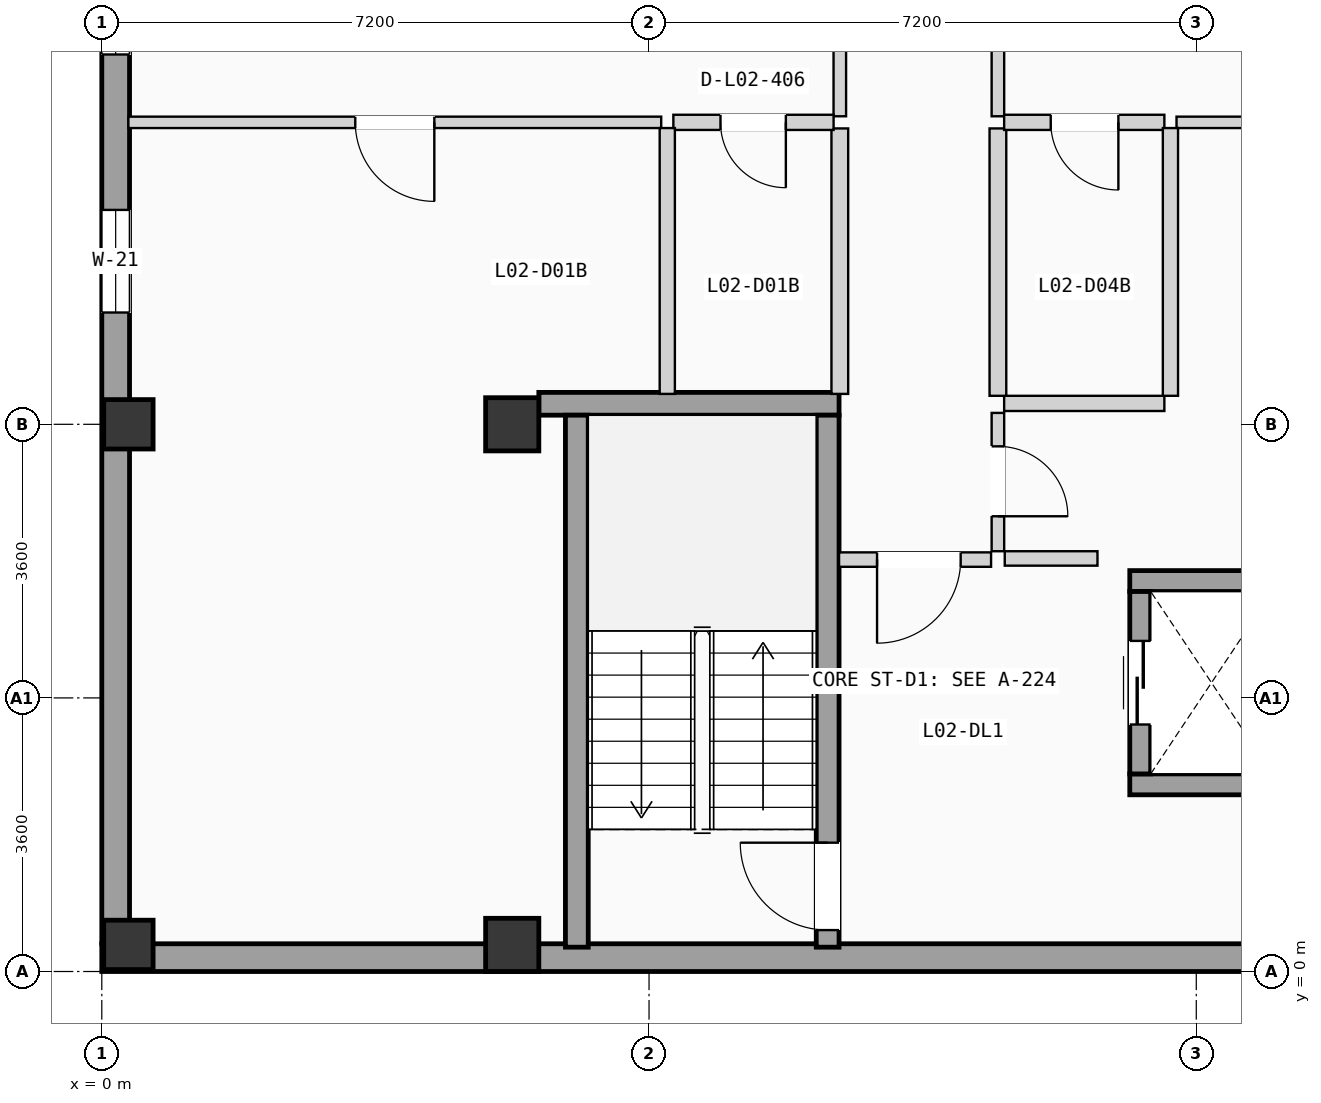
"""IFC4 building model, lengths in metres.
Left out: names, types, materials, properties, quantities, classifications, styles, units other than length and angle.
Written with IfcOpenShell. Run it as: python <this file> out.ifc"""

import sys

from ifc_helpers import new_model, si_unit, direction, frame, frame_2d, origin, origin_2d, place, context, subcontext, project, spatial, rectangle, extrude, element, fill, save


model = new_model("IFC4")
c1 = context("Model", 3, precision=1e-05, world=origin(), true_north=direction((0.0, 1.0)))
c2 = subcontext(c1, "Body", "Model", "MODEL_VIEW")
j1 = project(units=[si_unit("LENGTHUNIT", "METRE"), si_unit("PLANEANGLEUNIT", "RADIAN")], contexts=[c1])
p1 = place(None, origin())
s1 = spatial("IfcSite", under=j1, at=p1, CompositionType="ELEMENT")
p2 = place(p1, origin())
s2 = spatial("IfcBuilding", under=s1, at=p2, CompositionType="ELEMENT")
p3 = place(p2, frame((0.0, 0.0, 8.575)))
s3 = spatial("IfcBuildingStorey", under=s2, at=p3, CompositionType="ELEMENT", Elevation=8.575)
for number, where, z_axis, x_axis in (
    (1, (0.35, 0.35, 0.0), (0.0, 0.0, 1.0), (1.0, 0.0, 0.0)),
    (2, (0.35, 7.2, 0.0), (0.0, 0.0, 1.0), (1.0, 0.0, 0.0)),
):
    element("IfcColumn", number, at=place(p3, frame(where, z_axis=z_axis, x_axis=x_axis)), inside=s3, PredefinedType="COLUMN", context=c2, shape_type="SweptSolid", body=[
        extrude(rectangle(XDim=0.65, YDim=0.65, at=origin_2d()), origin(), (0.0, 0.0, 1.0), 3.5),
    ])
for number, where, z_axis, x_axis in (
    (3, (5.4, 0.35, 0.0), (0.0, 0.0, 1.0), (1.0, 0.0, 0.0)),
    (4, (5.4, 7.2, 0.0), (0.0, 0.0, 1.0), (1.0, 0.0, 0.0)),
):
    element("IfcColumn", number, at=place(p3, frame(where, z_axis=z_axis, x_axis=x_axis)), inside=s3, PredefinedType="COLUMN", context=c2, shape_type="SweptSolid", body=[
        extrude(rectangle(XDim=0.7, YDim=0.7, at=origin_2d()), origin(), (0.0, 0.0, 1.0), 3.5),
    ])
p4 = place(p3, frame((0.0, 0.183, 0.0), z_axis=(0.0, 0.0, 1.0), x_axis=(1.0, 0.0, 0.0)))
e5 = element("IfcWall", 5, at=p4, inside=s3, PredefinedType="SOLIDWALL", context=c2, shape_type="SweptSolid", body=[
    extrude(rectangle(XDim=21.6, YDim=0.365, at=frame_2d((10.8, 0.0))), origin(), (0.0, 0.0, 1.0), 3.24),
])
p5 = place(p3, frame((0.183, 0.365, 0.0), z_axis=(0.0, 0.0, 1.0), x_axis=(0.0, 1.0, 0.0)))
e6 = element("IfcWall", 6, at=p5, inside=s3, PredefinedType="SOLIDWALL", context=c2, shape_type="SweptSolid", body=[
    extrude(rectangle(XDim=49.67, YDim=0.365, at=frame_2d((24.835, 0.0))), origin(), (0.0, 0.0, 1.0), 3.24),
])
p6 = place(p5, frame((11.701, 0.0, 0.755)))
e7 = element("IfcOpeningElement", 7, at=p6, cuts=e6, PredefinedType="OPENING", context=c2, shape_type="SweptSolid", body=[
    extrude(rectangle(XDim=1.25, YDim=1.8, at=frame_2d((0.625, 0.9))), frame((0.0, 0.192, 0.0), z_axis=(0.0, -1.0, 0.0), x_axis=(1.0, 0.0, 0.0)), (0.0, 0.0, 1.0), 0.385),
])
p7 = place(p5, frame((8.306, 0.0, 0.9)))
e8 = element("IfcOpeningElement", 8, at=p7, cuts=e6, PredefinedType="OPENING", context=c2, shape_type="SweptSolid", body=[
    extrude(rectangle(XDim=1.35, YDim=1.2, at=frame_2d((0.675, 0.6))), frame((0.0, 0.192, 0.0), z_axis=(0.0, -1.0, 0.0), x_axis=(1.0, 0.0, 0.0)), (0.0, 0.0, 1.0), 0.385),
])
p8 = place(p5, frame((16.34, 0.0, 0.9)))
e9 = element("IfcOpeningElement", 9, at=p8, cuts=e6, PredefinedType="OPENING", context=c2, shape_type="SweptSolid", body=[
    extrude(rectangle(XDim=1.35, YDim=1.35, at=frame_2d((0.675, 0.675))), frame((0.0, 0.192, 0.0), z_axis=(0.0, -1.0, 0.0), x_axis=(1.0, 0.0, 0.0)), (0.0, 0.0, 1.0), 0.385),
])
p9 = place(p5, frame((24.16, 0.0, 0.9)))
e10 = element("IfcOpeningElement", 10, at=p9, cuts=e6, PredefinedType="OPENING", context=c2, shape_type="SweptSolid", body=[
    extrude(rectangle(XDim=1.35, YDim=1.5, at=frame_2d((0.675, 0.75))), frame((0.0, 0.192, 0.0), z_axis=(0.0, -1.0, 0.0), x_axis=(1.0, 0.0, 0.0)), (0.0, 0.0, 1.0), 0.385),
])
p10 = place(p5, frame((19.278, 0.0, 0.9)))
e11 = element("IfcOpeningElement", 11, at=p10, cuts=e6, PredefinedType="OPENING", context=c2, shape_type="SweptSolid", body=[
    extrude(rectangle(XDim=1.35, YDim=1.65, at=frame_2d((0.675, 0.825))), frame((0.0, 0.192, 0.0), z_axis=(0.0, -1.0, 0.0), x_axis=(1.0, 0.0, 0.0)), (0.0, 0.0, 1.0), 0.385),
])
p11 = place(p5, frame((29.042, 0.0, 0.755)))
e12 = element("IfcOpeningElement", 12, at=p11, cuts=e6, PredefinedType="OPENING", context=c2, shape_type="SweptSolid", body=[
    extrude(rectangle(XDim=1.35, YDim=1.8, at=frame_2d((0.675, 0.9))), frame((0.0, 0.192, 0.0), z_axis=(0.0, -1.0, 0.0), x_axis=(1.0, 0.0, 0.0)), (0.0, 0.0, 1.0), 0.385),
])
p12 = place(p5, frame((36.603, 0.0, 0.9)))
e13 = element("IfcOpeningElement", 13, at=p12, cuts=e6, PredefinedType="OPENING", context=c2, shape_type="SweptSolid", body=[
    extrude(rectangle(XDim=1.48, YDim=1.2, at=frame_2d((0.74, 0.6))), frame((0.0, 0.192, 0.0), z_axis=(0.0, -1.0, 0.0), x_axis=(1.0, 0.0, 0.0)), (0.0, 0.0, 1.0), 0.385),
])
p13 = place(p5, frame((31.915, 0.0, 0.9)))
e14 = element("IfcOpeningElement", 14, at=p13, cuts=e6, PredefinedType="OPENING", context=c2, shape_type="SweptSolid", body=[
    extrude(rectangle(XDim=1.48, YDim=1.35, at=frame_2d((0.74, 0.675))), frame((0.0, 0.192, 0.0), z_axis=(0.0, -1.0, 0.0), x_axis=(1.0, 0.0, 0.0)), (0.0, 0.0, 1.0), 0.385),
])
p14 = place(p5, frame((39.948, 0.0, 0.9)))
e15 = element("IfcOpeningElement", 15, at=p14, cuts=e6, PredefinedType="OPENING", context=c2, shape_type="SweptSolid", body=[
    extrude(rectangle(XDim=1.48, YDim=1.5, at=frame_2d((0.74, 0.75))), frame((0.0, 0.192, 0.0), z_axis=(0.0, -1.0, 0.0), x_axis=(1.0, 0.0, 0.0)), (0.0, 0.0, 1.0), 0.385),
])
p15 = place(p3, frame((5.75, 7.47, 0.0), z_axis=(0.0, 0.0, 1.0), x_axis=(1.0, 0.0, 0.0)))
e16 = element("IfcWall", 16, at=p15, inside=s3, PredefinedType="SHEAR", context=c2, shape_type="SweptSolid", body=[
    extrude(rectangle(XDim=3.95, YDim=0.3, at=frame_2d((1.975, 0.0))), origin(), (0.0, 0.0, 1.0), 3.24),
])
p16 = place(p3, frame((6.25, 0.32, 0.0), z_axis=(0.0, 0.0, 1.0), x_axis=(0.0, 1.0, 0.0)))
e17 = element("IfcWall", 17, at=p16, inside=s3, PredefinedType="SHEAR", context=c2, shape_type="SweptSolid", body=[
    extrude(rectangle(XDim=7.0, YDim=0.3, at=frame_2d((3.5, 0.0))), origin(), (0.0, 0.0, 1.0), 3.24),
])
p17 = place(p3, frame((9.55, 0.32, 0.0), z_axis=(0.0, 0.0, 1.0), x_axis=(0.0, 1.0, 0.0)))
e18 = element("IfcWall", 18, at=p17, inside=s3, PredefinedType="SHEAR", context=c2, shape_type="SweptSolid", body=[
    extrude(rectangle(XDim=7.0, YDim=0.3, at=frame_2d((3.5, 0.0))), origin(), (0.0, 0.0, 1.0), 3.24),
])
p18 = place(p17, frame((0.225, 0.0, 0.0)))
e19 = element("IfcOpeningElement", 19, at=p18, cuts=e18, PredefinedType="OPENING", context=c2, shape_type="SweptSolid", body=[
    extrude(rectangle(XDim=1.15, YDim=2.12, at=frame_2d((0.575, 1.06))), frame((0.0, 0.16, 0.0), z_axis=(0.0, -1.0, 0.0), x_axis=(1.0, 0.0, 0.0)), (0.0, 0.0, 1.0), 0.32),
])
for number, where, z_axis, x_axis in (
    (20, (13.525, 2.462, 0.0), (0.0, 0.0, 1.0), (1.0, 0.0, 0.0)),
    (21, (13.525, 5.137, 0.0), (0.0, 0.0, 1.0), (1.0, 0.0, 0.0)),
):
    element("IfcWall", number, at=place(p3, frame(where, z_axis=z_axis, x_axis=x_axis)), inside=s3, PredefinedType="SHEAR", context=c2, shape_type="SweptSolid", body=[
        extrude(rectangle(XDim=2.15, YDim=0.275, at=frame_2d((1.075, 0.0))), origin(), (0.0, 0.0, 1.0), 3.24),
    ])
p19 = place(p3, frame((13.663, 2.6, 0.0), z_axis=(0.0, 0.0, 1.0), x_axis=(0.0, 1.0, 0.0)))
e22 = element("IfcWall", 22, at=p19, inside=s3, PredefinedType="SHEAR", context=c2, shape_type="SweptSolid", body=[
    extrude(rectangle(XDim=2.4, YDim=0.275, at=frame_2d((1.2, 0.0))), origin(), (0.0, 0.0, 1.0), 3.24),
])
p20 = place(p19, frame((0.65, 0.0, 0.0)))
e23 = element("IfcOpeningElement", 23, at=p20, cuts=e22, PredefinedType="OPENING", context=c2, shape_type="SweptSolid", body=[
    extrude(rectangle(XDim=1.1, YDim=2.15, at=frame_2d((0.55, 1.075))), frame((0.0, 0.147, 0.0), z_axis=(0.0, -1.0, 0.0), x_axis=(1.0, 0.0, 0.0)), (0.0, 0.0, 1.0), 0.295),
])
p21 = place(p3, frame((11.88, 5.435, 0.0), z_axis=(0.0, 0.0, 1.0), x_axis=(1.0, 0.0, 0.0)))
e24 = element("IfcWall", 24, at=p21, inside=s3, PredefinedType="PARTITIONING", context=c2, shape_type="SweptSolid", body=[
    extrude(rectangle(XDim=1.22, YDim=0.19, at=frame_2d((0.61, 0.0))), origin(), (0.0, 0.0, 1.0), 3.22),
])
p22 = place(p3, frame((9.7, 5.42, 0.0), z_axis=(0.0, 0.0, 1.0), x_axis=(1.0, 0.0, 0.0)))
e25 = element("IfcWall", 25, at=p22, inside=s3, PredefinedType="PARTITIONING", context=c2, shape_type="SweptSolid", body=[
    extrude(rectangle(XDim=2.0, YDim=0.19, at=frame_2d((1.0, 0.0))), origin(), (0.0, 0.0, 1.0), 3.22),
])
p23 = place(p22, frame((0.5, 0.0, 0.0)))
e26 = element("IfcOpeningElement", 26, at=p23, cuts=e25, PredefinedType="OPENING", context=c2, shape_type="SweptSolid", body=[
    extrude(rectangle(XDim=1.1, YDim=2.12, at=frame_2d((0.55, 1.06))), frame((0.0, 0.105, 0.0), z_axis=(0.0, -1.0, 0.0), x_axis=(1.0, 0.0, 0.0)), (0.0, 0.0, 1.0), 0.21),
])
p24 = place(p3, frame((11.79, 5.53, 0.0), z_axis=(0.0, 0.0, 1.0), x_axis=(0.0, 1.0, 0.0)))
e27 = element("IfcWall", 27, at=p24, inside=s3, PredefinedType="PARTITIONING", context=c2, shape_type="SweptSolid", body=[
    extrude(rectangle(XDim=1.82, YDim=0.165, at=frame_2d((0.91, 0.0))), origin(), (0.0, 0.0, 1.0), 3.22),
])
p25 = place(p24, frame((0.46, 0.0, 0.0)))
e28 = element("IfcOpeningElement", 28, at=p25, cuts=e27, PredefinedType="OPENING", context=c2, shape_type="SweptSolid", body=[
    extrude(rectangle(XDim=0.92, YDim=2.04, at=frame_2d((0.46, 1.02))), frame((0.0, 0.093, 0.0), z_axis=(0.0, -1.0, 0.0), x_axis=(1.0, 0.0, 0.0)), (0.0, 0.0, 1.0), 0.185),
])
p26 = place(p3, frame((11.872, 7.475, 0.0), z_axis=(0.0, 0.0, 1.0), x_axis=(1.0, 0.0, 0.0)))
e29 = element("IfcWall", 29, at=p26, inside=s3, PredefinedType="PLUMBINGWALL", context=c2, shape_type="SweptSolid", body=[
    extrude(rectangle(XDim=2.108, YDim=0.2, at=frame_2d((1.054, 0.0))), origin(), (0.0, 0.0, 1.0), 3.22),
])
p27 = place(p3, frame((9.71, 11.253, 0.0), z_axis=(0.0, 0.0, 1.0), x_axis=(0.0, 1.0, 0.0)))
e30 = element("IfcWall", 30, at=p27, inside=s3, PredefinedType="PARTITIONING", context=c2, shape_type="SweptSolid", body=[
    extrude(rectangle(XDim=4.22, YDim=0.165, at=frame_2d((2.11, 0.0))), origin(), (0.0, 0.0, 1.0), 3.22),
])
p28 = place(p27, frame((1.585, 0.0, 0.0)))
e31 = element("IfcOpeningElement", 31, at=p28, cuts=e30, PredefinedType="OPENING", context=c2, shape_type="SweptSolid", body=[
    extrude(rectangle(XDim=1.05, YDim=2.13, at=frame_2d((0.525, 1.065))), frame((0.0, 0.093, 0.0), z_axis=(0.0, -1.0, 0.0), x_axis=(1.0, 0.0, 0.0)), (0.0, 0.0, 1.0), 0.185),
])
p29 = place(p3, frame((9.71, 7.6, 0.0), z_axis=(0.0, 0.0, 1.0), x_axis=(0.0, 1.0, 0.0)))
e32 = element("IfcWall", 32, at=p29, inside=s3, PredefinedType="PLUMBINGWALL", context=c2, shape_type="SweptSolid", body=[
    extrude(rectangle(XDim=3.493, YDim=0.22, at=frame_2d((1.747, 0.0))), origin(), (0.0, 0.0, 1.0), 3.22),
])
p30 = place(p3, frame((11.79, 11.253, 0.0), z_axis=(0.0, 0.0, 1.0), x_axis=(0.0, 1.0, 0.0)))
e33 = element("IfcWall", 33, at=p30, inside=s3, PredefinedType="PARTITIONING", context=c2, shape_type="SweptSolid", body=[
    extrude(rectangle(XDim=4.22, YDim=0.165, at=frame_2d((2.11, 0.0))), origin(), (0.0, 0.0, 1.0), 3.22),
])
p31 = place(p30, frame((1.585, 0.0, 0.0)))
e34 = element("IfcOpeningElement", 34, at=p31, cuts=e33, PredefinedType="OPENING", context=c2, shape_type="SweptSolid", body=[
    extrude(rectangle(XDim=1.05, YDim=2.13, at=frame_2d((0.525, 1.065))), frame((0.0, 0.093, 0.0), z_axis=(0.0, -1.0, 0.0), x_axis=(1.0, 0.0, 0.0)), (0.0, 0.0, 1.0), 0.185),
])
p32 = place(p3, frame((11.79, 7.575, 0.0), z_axis=(0.0, 0.0, 1.0), x_axis=(0.0, 1.0, 0.0)))
e35 = element("IfcWall", 35, at=p32, inside=s3, PredefinedType="PLUMBINGWALL", context=c2, shape_type="SweptSolid", body=[
    extrude(rectangle(XDim=3.518, YDim=0.22, at=frame_2d((1.759, 0.0))), origin(), (0.0, 0.0, 1.0), 3.22),
])
p33 = place(p3, frame((7.52, 11.173, 0.0), z_axis=(0.0, 0.0, 1.0), x_axis=(1.0, 0.0, 0.0)))
e36 = element("IfcWall", 36, at=p33, inside=s3, PredefinedType="PLUMBINGWALL", context=c2, shape_type="SweptSolid", body=[
    extrude(rectangle(XDim=2.108, YDim=0.2, at=frame_2d((1.054, 0.0))), origin(), (0.0, 0.0, 1.0), 3.22),
])
p34 = place(p33, frame((0.62, 0.0, 0.0)))
e37 = element("IfcOpeningElement", 37, at=p34, cuts=e36, PredefinedType="OPENING", context=c2, shape_type="SweptSolid", body=[
    extrude(rectangle(XDim=0.86, YDim=2.0, at=frame_2d((0.43, 1.0))), frame((0.0, 0.11, 0.0), z_axis=(0.0, -1.0, 0.0), x_axis=(1.0, 0.0, 0.0)), (0.0, 0.0, 1.0), 0.22),
])
p35 = place(p3, frame((0.35, 11.173, 0.0), z_axis=(0.0, 0.0, 1.0), x_axis=(1.0, 0.0, 0.0)))
e38 = element("IfcWall", 38, at=p35, inside=s3, PredefinedType="PARTITIONING", context=c2, shape_type="SweptSolid", body=[
    extrude(rectangle(XDim=7.01, YDim=0.15, at=frame_2d((3.505, 0.0))), origin(), (0.0, 0.0, 1.0), 3.22),
])
p36 = place(p35, frame((2.985, 0.0, 0.0)))
e39 = element("IfcOpeningElement", 39, at=p36, cuts=e38, PredefinedType="OPENING", context=c2, shape_type="SweptSolid", body=[
    extrude(rectangle(XDim=1.04, YDim=2.08, at=frame_2d((0.52, 1.04))), frame((0.0, 0.085, 0.0), z_axis=(0.0, -1.0, 0.0), x_axis=(1.0, 0.0, 0.0)), (0.0, 0.0, 1.0), 0.17),
])
p37 = place(p3, frame((7.44, 7.6, 0.0), z_axis=(0.0, 0.0, 1.0), x_axis=(0.0, 1.0, 0.0)))
e40 = element("IfcWall", 40, at=p37, inside=s3, PredefinedType="PLUMBINGWALL", context=c2, shape_type="SweptSolid", body=[
    extrude(rectangle(XDim=3.498, YDim=0.2, at=frame_2d((1.749, 0.0))), origin(), (0.0, 0.0, 1.0), 3.22),
])
p38 = place(p3, frame((11.872, 11.173, 0.0), z_axis=(0.0, 0.0, 1.0), x_axis=(1.0, 0.0, 0.0)))
e41 = element("IfcWall", 41, at=p38, inside=s3, PredefinedType="PLUMBINGWALL", context=c2, shape_type="SweptSolid", body=[
    extrude(rectangle(XDim=2.108, YDim=0.2, at=frame_2d((1.054, 0.0))), origin(), (0.0, 0.0, 1.0), 3.22),
])
p39 = place(p38, frame((0.613, 0.0, 0.0)))
e42 = element("IfcOpeningElement", 42, at=p39, cuts=e41, PredefinedType="OPENING", context=c2, shape_type="SweptSolid", body=[
    extrude(rectangle(XDim=0.89, YDim=2.03, at=frame_2d((0.445, 1.015))), frame((0.0, 0.11, 0.0), z_axis=(0.0, -1.0, 0.0), x_axis=(1.0, 0.0, 0.0)), (0.0, 0.0, 1.0), 0.22),
])
p40 = place(p3, frame((14.14, 11.173, 0.0), z_axis=(0.0, 0.0, 1.0), x_axis=(1.0, 0.0, 0.0)))
e43 = element("IfcWall", 43, at=p40, inside=s3, PredefinedType="PARTITIONING", context=c2, shape_type="SweptSolid", body=[
    extrude(rectangle(XDim=7.11, YDim=0.15, at=frame_2d((3.555, 0.0))), origin(), (0.0, 0.0, 1.0), 3.22),
])
p41 = place(p40, frame((3.035, 0.0, 0.0)))
e44 = element("IfcOpeningElement", 44, at=p41, cuts=e43, PredefinedType="OPENING", context=c2, shape_type="SweptSolid", body=[
    extrude(rectangle(XDim=1.04, YDim=2.08, at=frame_2d((0.52, 1.04))), frame((0.0, 0.085, 0.0), z_axis=(0.0, -1.0, 0.0), x_axis=(1.0, 0.0, 0.0)), (0.0, 0.0, 1.0), 0.17),
])
p42 = place(p3, frame((14.06, 7.575, 0.0), z_axis=(0.0, 0.0, 1.0), x_axis=(0.0, 1.0, 0.0)))
e45 = element("IfcWall", 45, at=p42, inside=s3, PredefinedType="PLUMBINGWALL", context=c2, shape_type="SweptSolid", body=[
    extrude(rectangle(XDim=3.523, YDim=0.2, at=frame_2d((1.761, 0.0))), origin(), (0.0, 0.0, 1.0), 3.22),
])
p43 = place(p6, origin())
e46 = element("IfcWindow", 46, at=p43, inside=s3, PartitioningType="SINGLE_PANEL", PredefinedType="WINDOW", context=c2, shape_type="SweptSolid", body=[
    extrude(rectangle(XDim=1.25, YDim=1.8, at=frame_2d((0.625, 0.9))), frame((0.0, 0.03, 0.0), z_axis=(0.0, -1.0, 0.0), x_axis=(1.0, 0.0, 0.0)), (0.0, 0.0, 1.0), 0.06),
])
fill(e7, e46)
p44 = place(p7, origin())
e47 = element("IfcWindow", 47, at=p44, inside=s3, PartitioningType="SINGLE_PANEL", PredefinedType="WINDOW", context=c2, shape_type="SweptSolid", body=[
    extrude(rectangle(XDim=1.35, YDim=1.2, at=frame_2d((0.675, 0.6))), frame((0.0, 0.03, 0.0), z_axis=(0.0, -1.0, 0.0), x_axis=(1.0, 0.0, 0.0)), (0.0, 0.0, 1.0), 0.06),
])
fill(e8, e47)
p45 = place(p18, origin())
e48 = element("IfcDoor", 48, at=p45, inside=s3, OperationType="SINGLE_SWING_RIGHT", PredefinedType="DOOR", context=c2, shape_type="SweptSolid", body=[
    extrude(rectangle(XDim=1.15, YDim=2.12, at=frame_2d((0.575, 1.06))), frame((0.0, 0.025, 0.0), z_axis=(0.0, -1.0, 0.0), x_axis=(1.0, 0.0, 0.0)), (0.0, 0.0, 1.0), 0.05),
])
fill(e19, e48)
p46 = place(p20, origin())
e49 = element("IfcDoor", 49, at=p46, inside=s3, OperationType="SLIDING_TO_LEFT", PredefinedType="DOOR", context=c2, shape_type="SweptSolid", body=[
    extrude(rectangle(XDim=1.1, YDim=2.15, at=frame_2d((0.55, 1.075))), frame((0.0, 0.025, 0.0), z_axis=(0.0, -1.0, 0.0), x_axis=(1.0, 0.0, 0.0)), (0.0, 0.0, 1.0), 0.05),
])
fill(e23, e49)
p47 = place(p23, frame((1.1, 0.0, 0.0), z_axis=(0.0, 0.0, 1.0), x_axis=(-1.0, 0.0, 0.0)))
e50 = element("IfcDoor", 50, at=p47, inside=s3, OperationType="SINGLE_SWING_LEFT", PredefinedType="DOOR", context=c2, shape_type="SweptSolid", body=[
    extrude(rectangle(XDim=1.1, YDim=2.12, at=frame_2d((0.55, 1.06))), frame((0.0, 0.025, 0.0), z_axis=(0.0, -1.0, 0.0), x_axis=(1.0, 0.0, 0.0)), (0.0, 0.0, 1.0), 0.05),
])
fill(e26, e50)
p48 = place(p25, frame((0.92, 0.0, 0.0), z_axis=(0.0, 0.0, 1.0), x_axis=(-1.0, 0.0, 0.0)))
e51 = element("IfcDoor", 51, at=p48, inside=s3, OperationType="SINGLE_SWING_LEFT", PredefinedType="DOOR", context=c2, shape_type="SweptSolid", body=[
    extrude(rectangle(XDim=0.92, YDim=2.04, at=frame_2d((0.46, 1.02))), frame((0.0, 0.025, 0.0), z_axis=(0.0, -1.0, 0.0), x_axis=(1.0, 0.0, 0.0)), (0.0, 0.0, 1.0), 0.05),
])
fill(e28, e51)
p49 = place(p34, frame((0.86, 0.0, 0.0), z_axis=(0.0, 0.0, 1.0), x_axis=(-1.0, 0.0, 0.0)))
e52 = element("IfcDoor", 52, at=p49, inside=s3, OperationType="SINGLE_SWING_RIGHT", PredefinedType="DOOR", context=c2, shape_type="SweptSolid", body=[
    extrude(rectangle(XDim=0.86, YDim=2.0, at=frame_2d((0.43, 1.0))), frame((0.0, 0.025, 0.0), z_axis=(0.0, -1.0, 0.0), x_axis=(1.0, 0.0, 0.0)), (0.0, 0.0, 1.0), 0.05),
])
fill(e37, e52)
p50 = place(p36, frame((1.04, 0.0, 0.0), z_axis=(0.0, 0.0, 1.0), x_axis=(-1.0, 0.0, 0.0)))
e53 = element("IfcDoor", 53, at=p50, inside=s3, OperationType="SINGLE_SWING_RIGHT", PredefinedType="DOOR", context=c2, shape_type="SweptSolid", body=[
    extrude(rectangle(XDim=1.04, YDim=2.08, at=frame_2d((0.52, 1.04))), frame((0.0, 0.025, 0.0), z_axis=(0.0, -1.0, 0.0), x_axis=(1.0, 0.0, 0.0)), (0.0, 0.0, 1.0), 0.05),
])
fill(e39, e53)
p51 = place(p39, frame((0.89, 0.0, 0.0), z_axis=(0.0, 0.0, 1.0), x_axis=(-1.0, 0.0, 0.0)))
e54 = element("IfcDoor", 54, at=p51, inside=s3, OperationType="SINGLE_SWING_RIGHT", PredefinedType="DOOR", context=c2, shape_type="SweptSolid", body=[
    extrude(rectangle(XDim=0.89, YDim=2.03, at=frame_2d((0.445, 1.015))), frame((0.0, 0.025, 0.0), z_axis=(0.0, -1.0, 0.0), x_axis=(1.0, 0.0, 0.0)), (0.0, 0.0, 1.0), 0.05),
])
fill(e42, e54)
save(model, sys.argv[1])
